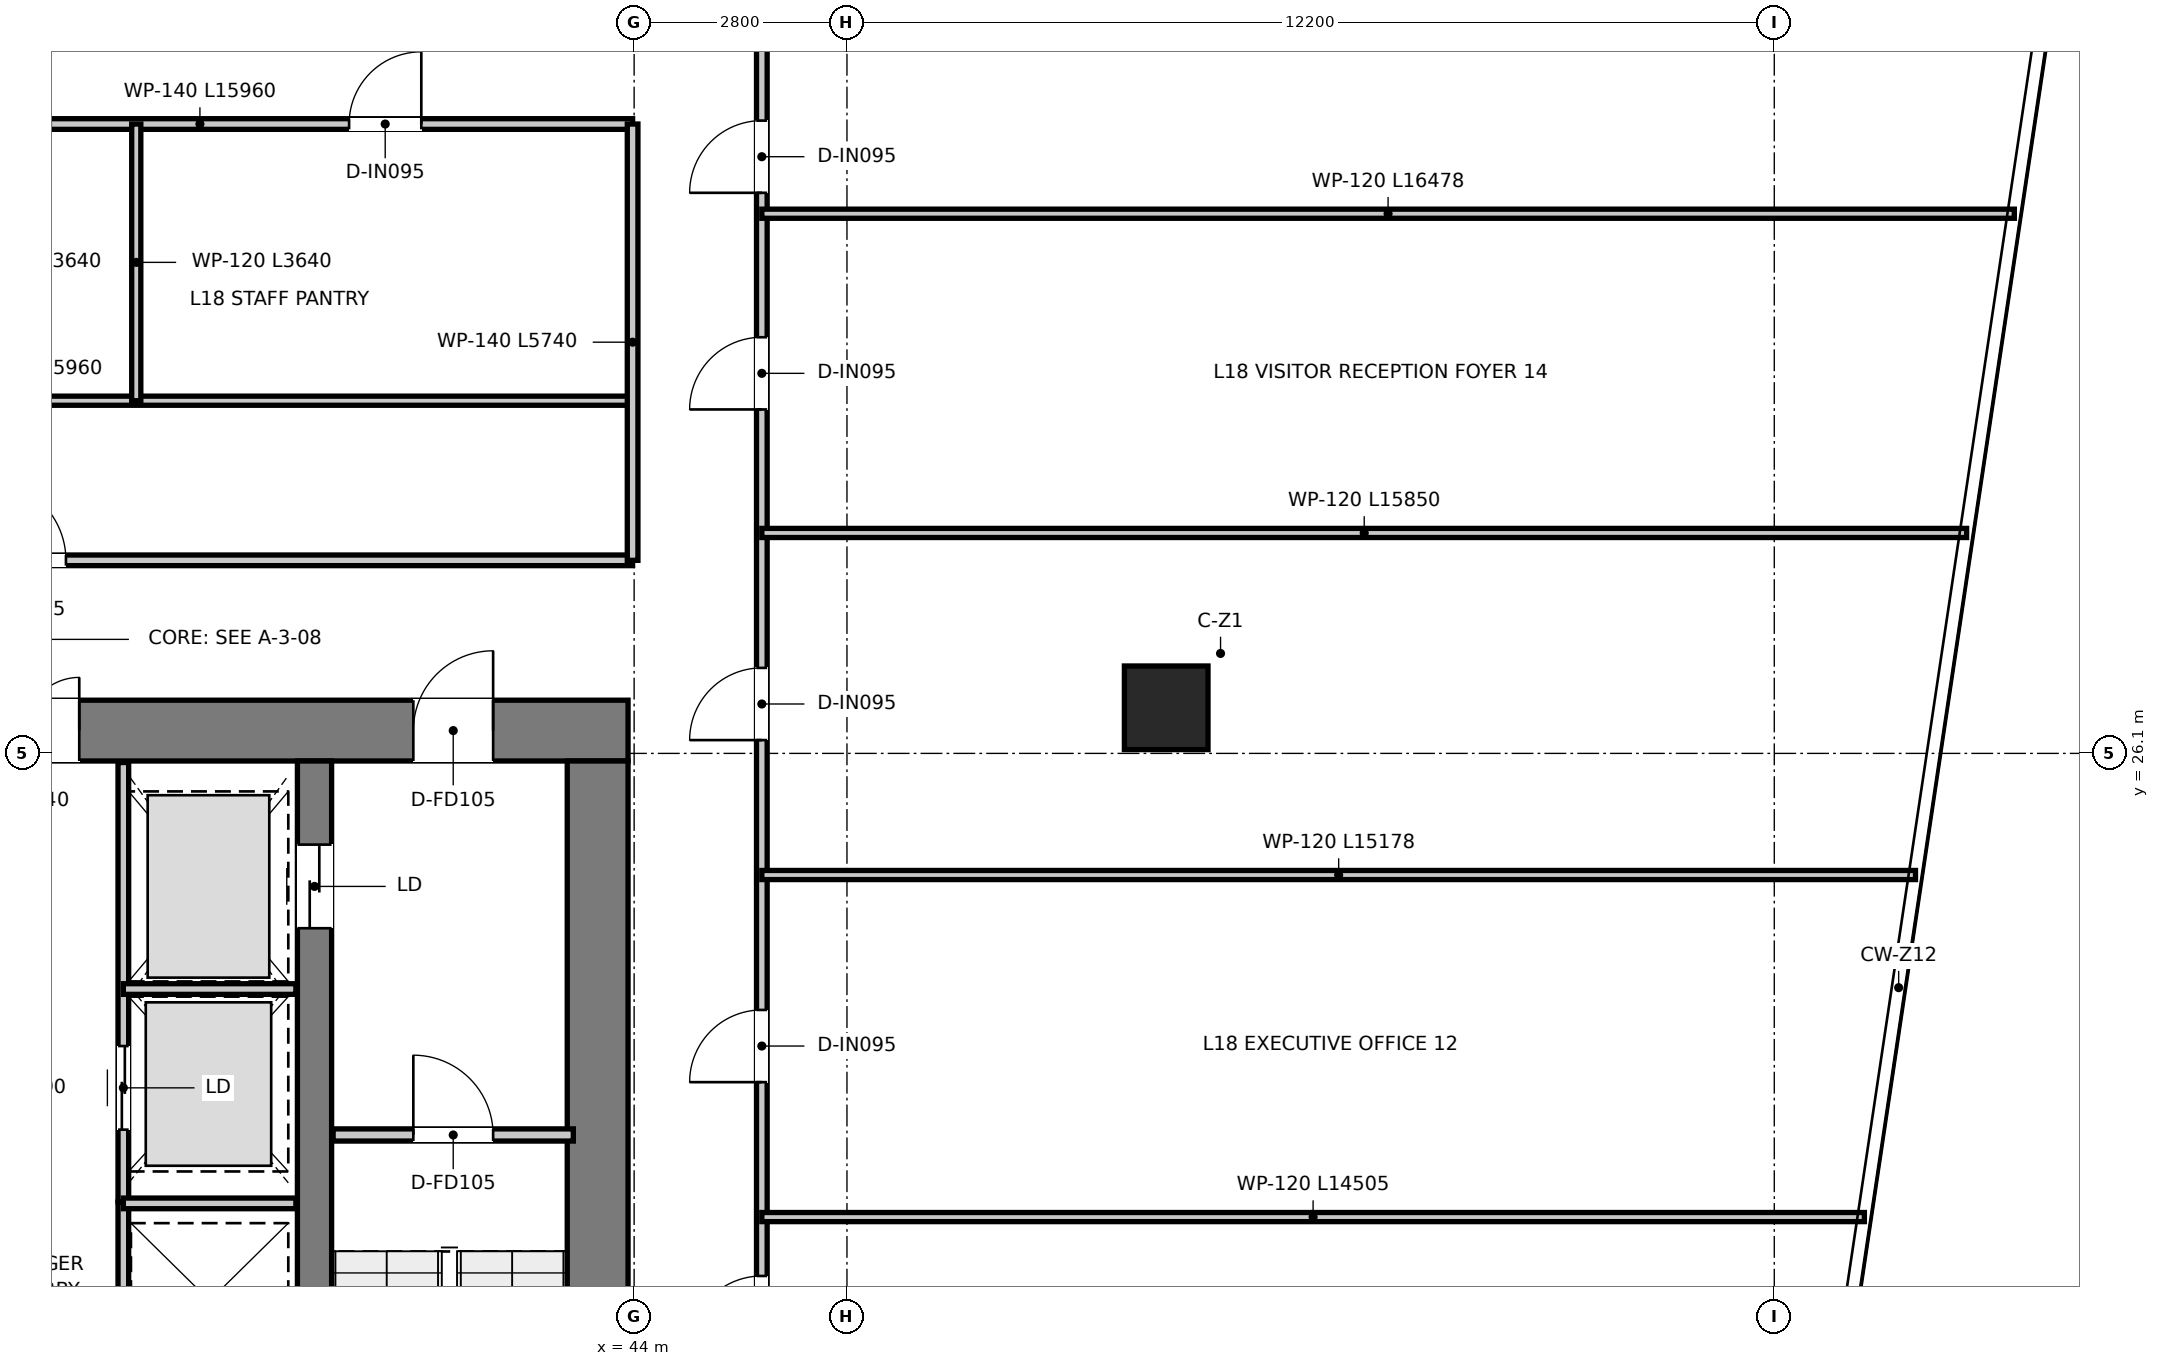
"""IFC4 building model, lengths in metres.
Left out: names, types, materials, properties, quantities, classifications, styles, units other than length and angle.
Written with IfcOpenShell. Run it as: python <this file> out.ifc"""

import sys

from ifc_helpers import new_model, si_unit, direction, frame, frame_2d, origin, origin_2d, place, context, subcontext, project, spatial, rectangle, extrude, source, transform, mapped, element, fill, save


model = new_model("IFC4")
c1 = context("Model", 3, precision=1e-05, world=origin(), true_north=direction((0.0, 1.0)))
c2 = subcontext(c1, "Body", "Model", "MODEL_VIEW")
j1 = project(units=[si_unit("LENGTHUNIT", "METRE"), si_unit("PLANEANGLEUNIT", "RADIAN")], contexts=[c1])
p1 = place(None, origin())
s1 = spatial("IfcSite", under=j1, at=p1, CompositionType="ELEMENT")
p2 = place(p1, origin())
s2 = spatial("IfcBuilding", under=s1, at=p2, CompositionType="ELEMENT")
p3 = place(p2, frame((0.0, 0.0, 76.35)))
s3 = spatial("IfcBuildingStorey", under=s2, at=p3, CompositionType="ELEMENT", Elevation=76.35)
p4 = place(p3, frame((28.08, 26.4, 0.0), z_axis=(0.0, 0.0, 1.0), x_axis=(1.0, 0.0, 0.0)))
e1 = element("IfcWall", 1, at=p4, inside=s3, PredefinedType="SHEAR", context=c2, shape_type="SweptSolid", body=[
    extrude(rectangle(XDim=15.84, YDim=0.8, at=frame_2d((7.92, 0.0))), origin(), (0.0, 0.0, 1.0), 3.95),
])
p5 = place(p4, frame((7.22, 0.0, 0.0)))
e2 = element("IfcOpeningElement", 2, at=p5, cuts=e1, PredefinedType="OPENING", context=c2, shape_type="SweptSolid", body=[
    extrude(rectangle(XDim=1.4, YDim=2.2, at=frame_2d((0.7, 1.1))), frame((0.0, 0.41, 0.0), z_axis=(0.0, -1.0, 0.0), x_axis=(1.0, 0.0, 0.0)), (0.0, 0.0, 1.0), 0.82),
])
p6 = place(p4, frame((1.775, 0.0, 0.0)))
e3 = element("IfcOpeningElement", 3, at=p6, cuts=e1, PredefinedType="OPENING", context=c2, shape_type="SweptSolid", body=[
    extrude(rectangle(XDim=1.05, YDim=2.1, at=frame_2d((0.525, 1.05))), frame((0.0, 0.41, 0.0), z_axis=(0.0, -1.0, 0.0), x_axis=(1.0, 0.0, 0.0)), (0.0, 0.0, 1.0), 0.82),
])
p7 = place(p4, frame((13.015, 0.0, 0.0)))
e4 = element("IfcOpeningElement", 4, at=p7, cuts=e1, PredefinedType="OPENING", context=c2, shape_type="SweptSolid", body=[
    extrude(rectangle(XDim=1.05, YDim=2.1, at=frame_2d((0.525, 1.05))), frame((0.0, 0.41, 0.0), z_axis=(0.0, -1.0, 0.0), x_axis=(1.0, 0.0, 0.0)), (0.0, 0.0, 1.0), 0.82),
])
p8 = place(p3, frame((43.52, 11.3, 0.0), z_axis=(0.0, 0.0, 1.0), x_axis=(0.0, 1.0, 0.0)))
e5 = element("IfcWall", 5, at=p8, inside=s3, PredefinedType="SHEAR", context=c2, shape_type="SweptSolid", body=[
    extrude(rectangle(XDim=14.7, YDim=0.8, at=frame_2d((7.35, 0.0))), origin(), (0.0, 0.0, 1.0), 3.95),
])
p9 = place(p3, frame((39.795, 13.22, 0.0), z_axis=(0.0, 0.0, 1.0), x_axis=(0.0, 1.0, 0.0)))
e6 = element("IfcWall", 6, at=p9, inside=s3, PredefinedType="SHEAR", context=c2, shape_type="SweptSolid", body=[
    extrude(rectangle(XDim=12.78, YDim=0.45, at=frame_2d((6.39, 0.0))), origin(), (0.0, 0.0, 1.0), 3.95),
])
p10 = place(p9, frame((10.58, 0.0, 0.0)))
e7 = element("IfcOpeningElement", 7, at=p10, cuts=e6, PredefinedType="OPENING", context=c2, shape_type="SweptSolid", body=[
    extrude(rectangle(XDim=1.1, YDim=2.15, at=frame_2d((0.55, 1.075))), frame((0.0, 0.235, 0.0), z_axis=(0.0, -1.0, 0.0), x_axis=(1.0, 0.0, 0.0)), (0.0, 0.0, 1.0), 0.47),
])
m1 = source(origin(), c2, "Body", "SweptSolid", [
    extrude(rectangle(XDim=1.1, YDim=1.1, at=origin_2d()), origin(), (0.0, 0.0, 1.0), 3.95),
])
p11 = place(p3, frame((51.0, 26.7, 0.0), z_axis=(0.0, 0.0, 1.0), x_axis=(1.0, 0.0, 0.0)))
e8 = element("IfcColumn", 8, at=p11, inside=s3, PredefinedType="COLUMN", context=c2, shape_type="MappedRepresentation", body=[
    mapped(m1, transform((0.0, 0.0, 0.0), x_axis=(1.0, 0.0, 0.0), y_axis=(0.0, 1.0, 0.0), z_axis=(0.0, 0.0, 1.0), scale=1.0)),
])
p12 = place(p3, frame((40.04, 21.08, 0.0), z_axis=(0.0, 0.0, 1.0), x_axis=(1.0, 0.0, 0.0)))
e9 = element("IfcWall", 9, at=p12, inside=s3, PredefinedType="PARTITIONING", context=c2, shape_type="SweptSolid", body=[
    extrude(rectangle(XDim=3.16, YDim=0.16, at=frame_2d((1.58, 0.0))), origin(), (0.0, 0.0, 1.0), 3.59),
])
p13 = place(p12, frame((1.055, 0.0, 0.0)))
e10 = element("IfcOpeningElement", 10, at=p13, cuts=e9, PredefinedType="OPENING", context=c2, shape_type="SweptSolid", body=[
    extrude(rectangle(XDim=1.05, YDim=2.1, at=frame_2d((0.525, 1.05))), frame((0.0, 0.09, 0.0), z_axis=(0.0, -1.0, 0.0), x_axis=(1.0, 0.0, 0.0)), (0.0, 0.0, 1.0), 0.18),
])
p14 = place(p3, frame((37.28, 20.2, 0.0), z_axis=(0.0, 0.0, 1.0), x_axis=(0.0, 1.0, 0.0)))
e11 = element("IfcWall", 11, at=p14, inside=s3, PredefinedType="PARTITIONING", context=c2, shape_type="SweptSolid", body=[
    extrude(rectangle(XDim=5.78, YDim=0.14, at=frame_2d((2.89, 0.0))), origin(), (0.0, 0.0, 1.0), 2.39),
])
p15 = place(p14, frame((0.95, 0.0, 0.0)))
e12 = element("IfcOpeningElement", 12, at=p15, cuts=e11, PredefinedType="OPENING", context=c2, shape_type="SweptSolid", body=[
    extrude(rectangle(XDim=1.1, YDim=2.15, at=frame_2d((0.55, 1.075))), frame((0.0, 0.08, 0.0), z_axis=(0.0, -1.0, 0.0), x_axis=(1.0, 0.0, 0.0)), (0.0, 0.0, 1.0), 0.16),
])
p16 = place(p3, frame((37.28, 23.0, 0.0), z_axis=(0.0, 0.0, 1.0), x_axis=(1.0, 0.0, 0.0)))
e13 = element("IfcWall", 13, at=p16, inside=s3, PredefinedType="PARTITIONING", context=c2, shape_type="SweptSolid", body=[
    extrude(rectangle(XDim=2.27, YDim=0.14, at=frame_2d((1.135, 0.0))), origin(), (0.0, 0.0, 1.0), 2.39),
])
p17 = place(p3, frame((37.28, 17.78, 0.0), z_axis=(0.0, 0.0, 1.0), x_axis=(0.0, 1.0, 0.0)))
e14 = element("IfcWall", 14, at=p17, inside=s3, PredefinedType="PARTITIONING", context=c2, shape_type="SweptSolid", body=[
    extrude(rectangle(XDim=2.42, YDim=0.14, at=frame_2d((1.21, 0.0))), origin(), (0.0, 0.0, 1.0), 3.59),
])
p18 = place(p3, frame((37.28, 20.18, 0.0), z_axis=(0.0, 0.0, 1.0), x_axis=(1.0, 0.0, 0.0)))
e15 = element("IfcWall", 15, at=p18, inside=s3, PredefinedType="PARTITIONING", context=c2, shape_type="SweptSolid", body=[
    extrude(rectangle(XDim=2.27, YDim=0.14, at=frame_2d((1.135, 0.0))), origin(), (0.0, 0.0, 1.0), 3.59),
])
p19 = place(p3, frame((28.02, 28.64, 0.0), z_axis=(0.0, 0.0, 1.0), x_axis=(1.0, 0.0, 0.0)))
e16 = element("IfcWall", 16, at=p19, inside=s3, PredefinedType="PARTITIONING", context=c2, shape_type="SweptSolid", body=[
    extrude(rectangle(XDim=15.96, YDim=0.14, at=frame_2d((7.98, 0.0))), origin(), (0.0, 0.0, 1.0), 3.0),
])
p20 = place(p19, frame((7.455, 0.0, 0.0)))
e17 = element("IfcOpeningElement", 17, at=p20, cuts=e16, PredefinedType="OPENING", context=c2, shape_type="SweptSolid", body=[
    extrude(rectangle(XDim=1.05, YDim=2.15, at=frame_2d((0.525, 1.075))), frame((0.0, 0.08, 0.0), z_axis=(0.0, -1.0, 0.0), x_axis=(1.0, 0.0, 0.0)), (0.0, 0.0, 1.0), 0.16),
])
p21 = place(p3, frame((28.02, 30.74, 0.0), z_axis=(0.0, 0.0, 1.0), x_axis=(1.0, 0.0, 0.0)))
e18 = element("IfcWall", 18, at=p21, inside=s3, PredefinedType="PARTITIONING", context=c2, shape_type="SweptSolid", body=[
    extrude(rectangle(XDim=15.96, YDim=0.12, at=frame_2d((7.98, 0.0))), origin(), (0.0, 0.0, 1.0), 3.0),
])
p22 = place(p3, frame((28.02, 34.38, 0.0), z_axis=(0.0, 0.0, 1.0), x_axis=(1.0, 0.0, 0.0)))
e19 = element("IfcWall", 19, at=p22, inside=s3, PredefinedType="PARTITIONING", context=c2, shape_type="SweptSolid", body=[
    extrude(rectangle(XDim=15.96, YDim=0.14, at=frame_2d((7.98, 0.0))), origin(), (0.0, 0.0, 1.0), 3.0),
])
p23 = place(p22, frame((1.13, 0.0, 0.0)))
e20 = element("IfcOpeningElement", 20, at=p23, cuts=e19, PredefinedType="OPENING", context=c2, shape_type="SweptSolid", body=[
    extrude(rectangle(XDim=0.9, YDim=2.1, at=frame_2d((0.45, 1.05))), frame((0.0, 0.08, 0.0), z_axis=(0.0, -1.0, 0.0), x_axis=(1.0, 0.0, 0.0)), (0.0, 0.0, 1.0), 0.16),
])
p24 = place(p22, frame((4.33, 0.0, 0.0)))
e21 = element("IfcOpeningElement", 21, at=p24, cuts=e19, PredefinedType="OPENING", context=c2, shape_type="SweptSolid", body=[
    extrude(rectangle(XDim=0.9, YDim=2.1, at=frame_2d((0.45, 1.05))), frame((0.0, 0.08, 0.0), z_axis=(0.0, -1.0, 0.0), x_axis=(1.0, 0.0, 0.0)), (0.0, 0.0, 1.0), 0.16),
])
p25 = place(p22, frame((7.355, 0.0, 0.0)))
e22 = element("IfcOpeningElement", 22, at=p25, cuts=e19, PredefinedType="OPENING", context=c2, shape_type="SweptSolid", body=[
    extrude(rectangle(XDim=0.95, YDim=2.1, at=frame_2d((0.475, 1.05))), frame((0.0, 0.08, 0.0), z_axis=(0.0, -1.0, 0.0), x_axis=(1.0, 0.0, 0.0)), (0.0, 0.0, 1.0), 0.16),
])
p26 = place(p22, frame((12.23, 0.0, 0.0)))
e23 = element("IfcOpeningElement", 23, at=p26, cuts=e19, PredefinedType="OPENING", context=c2, shape_type="SweptSolid", body=[
    extrude(rectangle(XDim=0.95, YDim=2.1, at=frame_2d((0.475, 1.05))), frame((0.0, 0.08, 0.0), z_axis=(0.0, -1.0, 0.0), x_axis=(1.0, 0.0, 0.0)), (0.0, 0.0, 1.0), 0.16),
])
p27 = place(p3, frame((43.98, 28.64, 0.0), z_axis=(0.0, 0.0, 1.0), x_axis=(0.0, 1.0, 0.0)))
e24 = element("IfcWall", 24, at=p27, inside=s3, PredefinedType="PARTITIONING", context=c2, shape_type="SweptSolid", body=[
    extrude(rectangle(XDim=5.74, YDim=0.14, at=frame_2d((2.87, 0.0))), origin(), (0.0, 0.0, 1.0), 3.14),
])
p28 = place(p3, frame((37.45, 30.74, 0.0), z_axis=(0.0, 0.0, 1.0), x_axis=(0.0, 1.0, 0.0)))
e25 = element("IfcWall", 25, at=p28, inside=s3, PredefinedType="PARTITIONING", context=c2, shape_type="SweptSolid", body=[
    extrude(rectangle(XDim=3.64, YDim=0.12, at=frame_2d((1.82, 0.0))), origin(), (0.0, 0.0, 1.0), 3.04),
])
p29 = place(p3, frame((45.68, 10.5, 0.0), z_axis=(0.0, 0.0, 1.0), x_axis=(0.0, 1.0, 0.0)))
e26 = element("IfcWall", 26, at=p29, inside=s3, PredefinedType="PARTITIONING", context=c2, shape_type="SweptSolid", body=[
    extrude(rectangle(XDim=25.62, YDim=0.14, at=frame_2d((12.81, 0.0))), origin(), (0.0, 0.0, 1.0), 2.89),
])
p30 = place(p29, frame((7.775, 0.0, 0.0)))
e27 = element("IfcOpeningElement", 27, at=p30, cuts=e26, PredefinedType="OPENING", context=c2, shape_type="SweptSolid", body=[
    extrude(rectangle(XDim=0.95, YDim=2.1, at=frame_2d((0.475, 1.05))), frame((0.0, 0.08, 0.0), z_axis=(0.0, -1.0, 0.0), x_axis=(1.0, 0.0, 0.0)), (0.0, 0.0, 1.0), 0.16),
])
p31 = place(p29, frame((11.275, 0.0, 0.0)))
e28 = element("IfcOpeningElement", 28, at=p31, cuts=e26, PredefinedType="OPENING", context=c2, shape_type="SweptSolid", body=[
    extrude(rectangle(XDim=0.95, YDim=2.1, at=frame_2d((0.475, 1.05))), frame((0.0, 0.08, 0.0), z_axis=(0.0, -1.0, 0.0), x_axis=(1.0, 0.0, 0.0)), (0.0, 0.0, 1.0), 0.16),
])
p32 = place(p29, frame((15.775, 0.0, 0.0)))
e29 = element("IfcOpeningElement", 29, at=p32, cuts=e26, PredefinedType="OPENING", context=c2, shape_type="SweptSolid", body=[
    extrude(rectangle(XDim=0.95, YDim=2.1, at=frame_2d((0.475, 1.05))), frame((0.0, 0.08, 0.0), z_axis=(0.0, -1.0, 0.0), x_axis=(1.0, 0.0, 0.0)), (0.0, 0.0, 1.0), 0.16),
])
p33 = place(p29, frame((20.125, 0.0, 0.0)))
e30 = element("IfcOpeningElement", 30, at=p33, cuts=e26, PredefinedType="OPENING", context=c2, shape_type="SweptSolid", body=[
    extrude(rectangle(XDim=0.95, YDim=2.1, at=frame_2d((0.475, 1.05))), frame((0.0, 0.08, 0.0), z_axis=(0.0, -1.0, 0.0), x_axis=(1.0, 0.0, 0.0)), (0.0, 0.0, 1.0), 0.16),
])
p34 = place(p29, frame((22.975, 0.0, 0.0)))
e31 = element("IfcOpeningElement", 31, at=p34, cuts=e26, PredefinedType="OPENING", context=c2, shape_type="SweptSolid", body=[
    extrude(rectangle(XDim=0.95, YDim=2.1, at=frame_2d((0.475, 1.05))), frame((0.0, 0.08, 0.0), z_axis=(0.0, -1.0, 0.0), x_axis=(1.0, 0.0, 0.0)), (0.0, 0.0, 1.0), 0.16),
])
p35 = place(p3, frame((45.68, 20.0, 0.0), z_axis=(0.0, 0.0, 1.0), x_axis=(1.0, 0.0, 0.0)))
e32 = element("IfcWall", 32, at=p35, inside=s3, PredefinedType="PARTITIONING", context=c2, shape_type="SweptSolid", body=[
    extrude(rectangle(XDim=14.505, YDim=0.12, at=frame_2d((7.253, 0.0))), origin(), (0.0, 0.0, 1.0), 2.89),
])
p36 = place(p3, frame((45.68, 24.5, 0.0), z_axis=(0.0, 0.0, 1.0), x_axis=(1.0, 0.0, 0.0)))
e33 = element("IfcWall", 33, at=p36, inside=s3, PredefinedType="PARTITIONING", context=c2, shape_type="SweptSolid", body=[
    extrude(rectangle(XDim=15.178, YDim=0.12, at=frame_2d((7.589, 0.0))), origin(), (0.0, 0.0, 1.0), 2.89),
])
p37 = place(p3, frame((45.68, 29.0, 0.0), z_axis=(0.0, 0.0, 1.0), x_axis=(1.0, 0.0, 0.0)))
e34 = element("IfcWall", 34, at=p37, inside=s3, PredefinedType="PARTITIONING", context=c2, shape_type="SweptSolid", body=[
    extrude(rectangle(XDim=15.851, YDim=0.12, at=frame_2d((7.925, 0.0))), origin(), (0.0, 0.0, 1.0), 2.89),
])
p38 = place(p3, frame((45.68, 33.2, 0.0), z_axis=(0.0, 0.0, 1.0), x_axis=(1.0, 0.0, 0.0)))
e35 = element("IfcWall", 35, at=p38, inside=s3, PredefinedType="PARTITIONING", context=c2, shape_type="SweptSolid", body=[
    extrude(rectangle(XDim=16.478, YDim=0.12, at=frame_2d((8.239, 0.0))), origin(), (0.0, 0.0, 1.0), 2.89),
])
p39 = place(p13, origin())
e36 = element("IfcDoor", 36, at=p39, inside=s3, OperationType="SINGLE_SWING_LEFT", PredefinedType="DOOR", context=c2, shape_type="SweptSolid", body=[
    extrude(rectangle(XDim=1.05, YDim=2.1, at=frame_2d((0.525, 1.05))), frame((0.0, 0.025, 0.0), z_axis=(0.0, -1.0, 0.0), x_axis=(1.0, 0.0, 0.0)), (0.0, 0.0, 1.0), 0.05),
])
fill(e10, e36)
p40 = place(p5, origin())
e37 = element("IfcDoor", 37, at=p40, inside=s3, OperationType="DOUBLE_DOOR_SINGLE_SWING", PredefinedType="DOOR", context=c2, shape_type="SweptSolid", body=[
    extrude(rectangle(XDim=1.4, YDim=2.2, at=frame_2d((0.7, 1.1))), frame((0.0, 0.025, 0.0), z_axis=(0.0, -1.0, 0.0), x_axis=(1.0, 0.0, 0.0)), (0.0, 0.0, 1.0), 0.05),
])
fill(e2, e37)
p41 = place(p7, origin())
e38 = element("IfcDoor", 38, at=p41, inside=s3, OperationType="SINGLE_SWING_RIGHT", PredefinedType="DOOR", context=c2, shape_type="SweptSolid", body=[
    extrude(rectangle(XDim=1.05, YDim=2.1, at=frame_2d((0.525, 1.05))), frame((0.0, 0.025, 0.0), z_axis=(0.0, -1.0, 0.0), x_axis=(1.0, 0.0, 0.0)), (0.0, 0.0, 1.0), 0.05),
])
fill(e4, e38)
p42 = place(p10, origin())
e39 = element("IfcDoor", 39, at=p42, inside=s3, OperationType="DOUBLE_DOOR_SLIDING", PredefinedType="DOOR", context=c2, shape_type="SweptSolid", body=[
    extrude(rectangle(XDim=1.1, YDim=2.15, at=frame_2d((0.55, 1.075))), frame((0.0, 0.025, 0.0), z_axis=(0.0, -1.0, 0.0), x_axis=(1.0, 0.0, 0.0)), (0.0, 0.0, 1.0), 0.05),
])
fill(e7, e39)
p43 = place(p15, origin())
e40 = element("IfcDoor", 40, at=p43, inside=s3, OperationType="DOUBLE_DOOR_SLIDING", PredefinedType="DOOR", context=c2, shape_type="SweptSolid", body=[
    extrude(rectangle(XDim=1.1, YDim=2.15, at=frame_2d((0.55, 1.075))), frame((0.0, 0.025, 0.0), z_axis=(0.0, -1.0, 0.0), x_axis=(1.0, 0.0, 0.0)), (0.0, 0.0, 1.0), 0.05),
])
fill(e12, e40)
p44 = place(p20, origin())
e41 = element("IfcDoor", 41, at=p44, inside=s3, OperationType="SINGLE_SWING_LEFT", PredefinedType="DOOR", context=c2, shape_type="SweptSolid", body=[
    extrude(rectangle(XDim=1.05, YDim=2.15, at=frame_2d((0.525, 1.075))), frame((0.0, 0.025, 0.0), z_axis=(0.0, -1.0, 0.0), x_axis=(1.0, 0.0, 0.0)), (0.0, 0.0, 1.0), 0.05),
])
fill(e17, e41)
p45 = place(p26, origin())
e42 = element("IfcDoor", 42, at=p45, inside=s3, OperationType="SINGLE_SWING_RIGHT", PredefinedType="DOOR", context=c2, shape_type="SweptSolid", body=[
    extrude(rectangle(XDim=0.95, YDim=2.1, at=frame_2d((0.475, 1.05))), frame((0.0, 0.025, 0.0), z_axis=(0.0, -1.0, 0.0), x_axis=(1.0, 0.0, 0.0)), (0.0, 0.0, 1.0), 0.05),
])
fill(e23, e42)
p46 = place(p30, origin())
e43 = element("IfcDoor", 43, at=p46, inside=s3, OperationType="SINGLE_SWING_LEFT", PredefinedType="DOOR", context=c2, shape_type="SweptSolid", body=[
    extrude(rectangle(XDim=0.95, YDim=2.1, at=frame_2d((0.475, 1.05))), frame((0.0, 0.025, 0.0), z_axis=(0.0, -1.0, 0.0), x_axis=(1.0, 0.0, 0.0)), (0.0, 0.0, 1.0), 0.05),
])
fill(e27, e43)
p47 = place(p31, origin())
e44 = element("IfcDoor", 44, at=p47, inside=s3, OperationType="SINGLE_SWING_LEFT", PredefinedType="DOOR", context=c2, shape_type="SweptSolid", body=[
    extrude(rectangle(XDim=0.95, YDim=2.1, at=frame_2d((0.475, 1.05))), frame((0.0, 0.025, 0.0), z_axis=(0.0, -1.0, 0.0), x_axis=(1.0, 0.0, 0.0)), (0.0, 0.0, 1.0), 0.05),
])
fill(e28, e44)
p48 = place(p32, origin())
e45 = element("IfcDoor", 45, at=p48, inside=s3, OperationType="SINGLE_SWING_LEFT", PredefinedType="DOOR", context=c2, shape_type="SweptSolid", body=[
    extrude(rectangle(XDim=0.95, YDim=2.1, at=frame_2d((0.475, 1.05))), frame((0.0, 0.025, 0.0), z_axis=(0.0, -1.0, 0.0), x_axis=(1.0, 0.0, 0.0)), (0.0, 0.0, 1.0), 0.05),
])
fill(e29, e45)
p49 = place(p33, origin())
e46 = element("IfcDoor", 46, at=p49, inside=s3, OperationType="SINGLE_SWING_LEFT", PredefinedType="DOOR", context=c2, shape_type="SweptSolid", body=[
    extrude(rectangle(XDim=0.95, YDim=2.1, at=frame_2d((0.475, 1.05))), frame((0.0, 0.025, 0.0), z_axis=(0.0, -1.0, 0.0), x_axis=(1.0, 0.0, 0.0)), (0.0, 0.0, 1.0), 0.05),
])
fill(e30, e46)
p50 = place(p34, origin())
e47 = element("IfcDoor", 47, at=p50, inside=s3, OperationType="SINGLE_SWING_LEFT", PredefinedType="DOOR", context=c2, shape_type="SweptSolid", body=[
    extrude(rectangle(XDim=0.95, YDim=2.1, at=frame_2d((0.475, 1.05))), frame((0.0, 0.025, 0.0), z_axis=(0.0, -1.0, 0.0), x_axis=(1.0, 0.0, 0.0)), (0.0, 0.0, 1.0), 0.05),
])
fill(e31, e47)
save(model, sys.argv[1])
